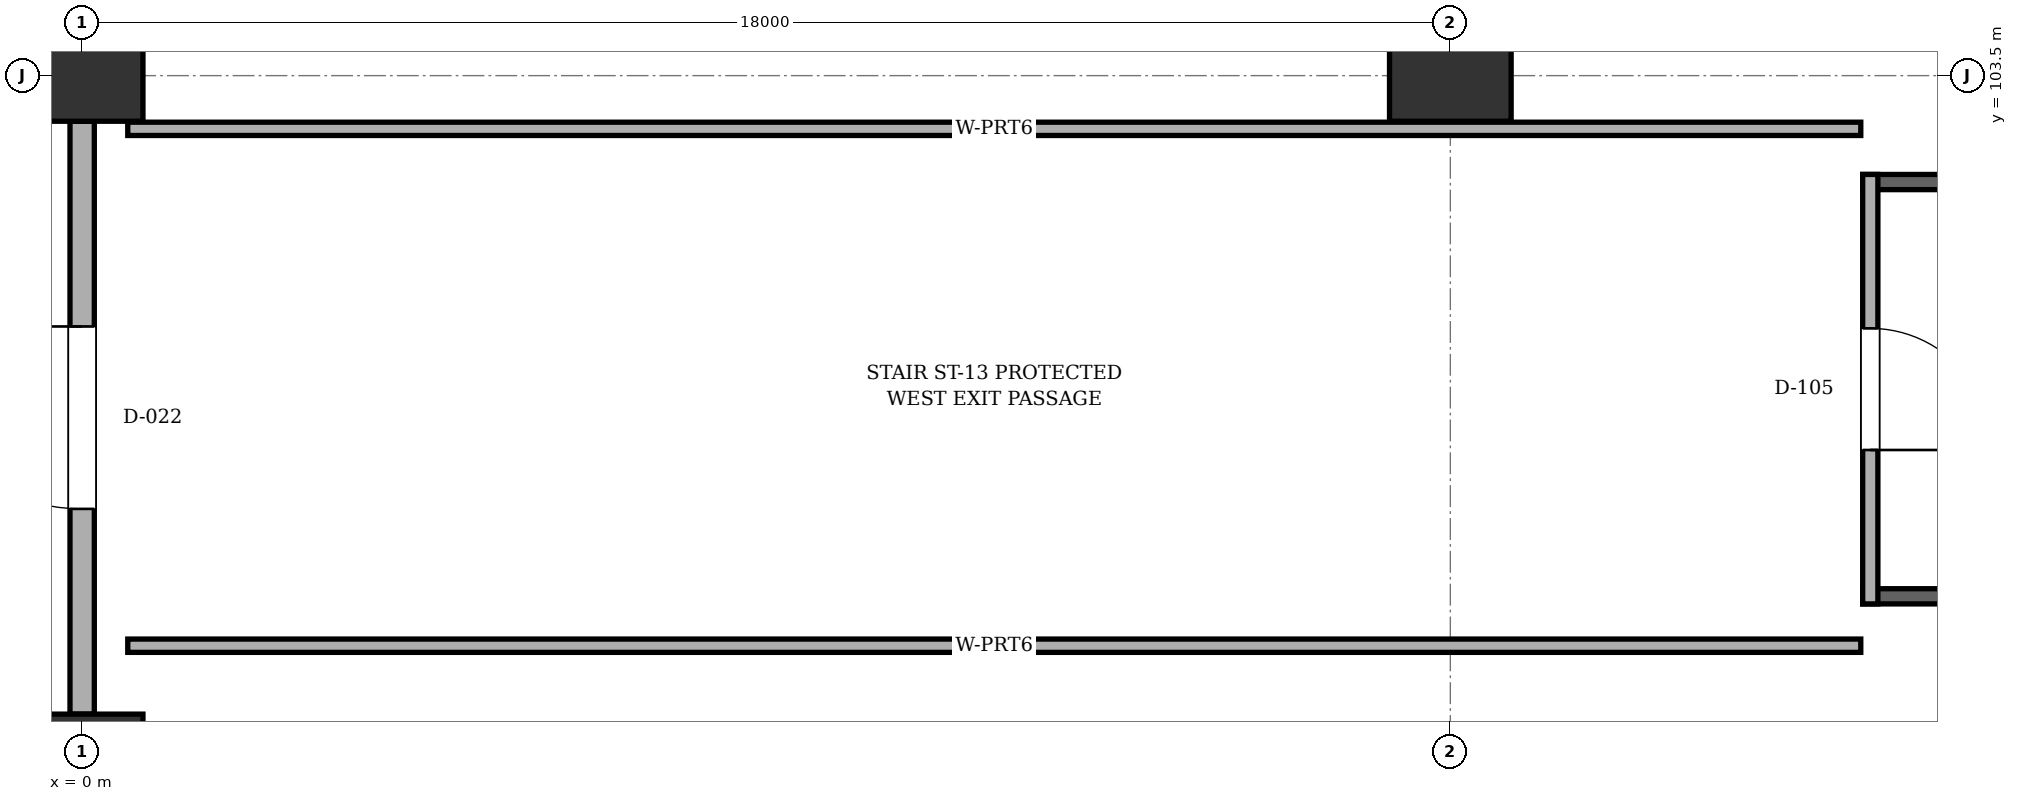
"""IFC4 building model, lengths in metres.
Left out: names, types, materials, properties, quantities, classifications, styles, units other than length and angle.
Written with IfcOpenShell. Run it as: python <this file> out.ifc"""

import sys

from ifc_helpers import new_model, si_unit, direction, frame, frame_2d, origin, origin_2d, place, context, subcontext, project, spatial, rectangle, extrude, element, fill, save


model = new_model("IFC4")
c1 = context("Model", 3, precision=1e-05, world=origin(), true_north=direction((0.0, 1.0)))
c2 = subcontext(c1, "Body", "Model", "MODEL_VIEW")
j1 = project(units=[si_unit("LENGTHUNIT", "METRE"), si_unit("PLANEANGLEUNIT", "RADIAN")], contexts=[c1])
p1 = place(None, origin())
s1 = spatial("IfcSite", under=j1, at=p1, CompositionType="ELEMENT")
p2 = place(p1, origin())
s2 = spatial("IfcBuilding", under=s1, at=p2, CompositionType="ELEMENT")
p3 = place(p2, origin())
s3 = spatial("IfcBuildingStorey", under=s2, at=p3, CompositionType="ELEMENT", Elevation=0.0)
for number, where, z_axis, x_axis in (
    (1, (0.0, 94.5, 0.0), (0.0, 0.0, 1.0), (1.0, 0.0, 0.0)),
    (2, (0.0, 103.5, 0.0), (0.0, 0.0, 1.0), (1.0, 0.0, 0.0)),
    (3, (18.0, 103.5, 0.0), (0.0, 0.0, 1.0), (1.0, 0.0, 0.0)),
):
    element("IfcColumn", number, at=place(p3, frame(where, z_axis=z_axis, x_axis=x_axis)), inside=s3, PredefinedType="COLUMN", context=c2, shape_type="SweptSolid", body=[
        extrude(rectangle(XDim=1.6, YDim=1.2, at=origin_2d()), origin(), (0.0, 0.0, 1.0), 6.6),
    ])
p4 = place(p3, frame((0.0, 95.1, 0.0), z_axis=(0.0, 0.0, 1.0), x_axis=(0.0, 1.0, 0.0)))
e4 = element("IfcWall", 4, at=p4, inside=s3, PredefinedType="SOLIDWALL", context=c2, shape_type="SweptSolid", body=[
    extrude(rectangle(XDim=7.8, YDim=0.32, at=frame_2d((3.9, 0.0))), origin(), (0.0, 0.0, 1.0), 5.495),
])
p5 = place(p4, frame((2.7, 0.0, 0.0)))
e5 = element("IfcOpeningElement", 5, at=p5, cuts=e4, PredefinedType="OPENING", context=c2, shape_type="SweptSolid", body=[
    extrude(rectangle(XDim=2.4, YDim=2.5, at=frame_2d((1.2, 1.25))), frame((0.0, 0.17, 0.0), z_axis=(0.0, -1.0, 0.0), x_axis=(1.0, 0.0, 0.0)), (0.0, 0.0, 1.0), 0.34),
])
for number, where, z_axis, x_axis in (
    (6, (23.425, 96.65, 0.0), (0.0, 0.0, 1.0), (1.0, 0.0, 0.0)),
    (7, (35.25, 102.1, 0.0), (0.0, 0.0, 1.0), (-1.0, 0.0, 0.0)),
):
    element("IfcWall", number, at=place(p3, frame(where, z_axis=z_axis, x_axis=x_axis)), inside=s3, PredefinedType="SOLIDWALL", context=c2, shape_type="SweptSolid", body=[
        extrude(rectangle(XDim=11.825, YDim=0.2, at=frame_2d((5.913, 0.0))), origin(), (0.0, 0.0, 1.0), 6.32),
    ])
p6 = place(p3, frame((23.525, 102.2, 0.0), z_axis=(0.0, 0.0, 1.0), x_axis=(0.0, -1.0, 0.0)))
e8 = element("IfcWall", 8, at=p6, inside=s3, PredefinedType="SOLIDWALL", context=c2, shape_type="SweptSolid", body=[
    extrude(rectangle(XDim=5.65, YDim=0.2, at=frame_2d((2.825, 0.0))), origin(), (0.0, 0.0, 1.0), 4.4),
])
p7 = place(p6, frame((2.025, 0.0, 0.0)))
e9 = element("IfcOpeningElement", 9, at=p7, cuts=e8, PredefinedType="OPENING", context=c2, shape_type="SweptSolid", body=[
    extrude(rectangle(XDim=1.6, YDim=2.15, at=frame_2d((0.8, 1.075))), frame((0.0, 0.11, 0.0), z_axis=(0.0, -1.0, 0.0), x_axis=(1.0, 0.0, 0.0)), (0.0, 0.0, 1.0), 0.22),
])
for number, where, z_axis, x_axis in (
    (10, (23.4, 96.0, 0.0), (0.0, 0.0, 1.0), (-1.0, 0.0, 0.0)),
    (11, (0.6, 102.8, 0.0), (0.0, 0.0, 1.0), (1.0, 0.0, 0.0)),
):
    element("IfcWall", number, at=place(p3, frame(where, z_axis=z_axis, x_axis=x_axis)), inside=s3, PredefinedType="PARTITIONING", context=c2, shape_type="SweptSolid", body=[
        extrude(rectangle(XDim=22.8, YDim=0.175, at=frame_2d((11.4, 0.0))), origin(), (0.0, 0.0, 1.0), 4.4),
    ])
p8 = place(p5, origin())
e12 = element("IfcDoor", 12, at=p8, inside=s3, OperationType="SINGLE_SWING_RIGHT", PredefinedType="DOOR", context=c2, shape_type="SweptSolid", body=[
    extrude(rectangle(XDim=2.4, YDim=2.5, at=frame_2d((1.2, 1.25))), frame((0.0, 0.025, 0.0), z_axis=(0.0, -1.0, 0.0), x_axis=(1.0, 0.0, 0.0)), (0.0, 0.0, 1.0), 0.05),
])
fill(e5, e12)
p9 = place(p7, origin())
e13 = element("IfcDoor", 13, at=p9, inside=s3, OperationType="SINGLE_SWING_RIGHT", PredefinedType="DOOR", context=c2, shape_type="SweptSolid", body=[
    extrude(rectangle(XDim=1.6, YDim=2.15, at=frame_2d((0.8, 1.075))), frame((0.0, 0.025, 0.0), z_axis=(0.0, -1.0, 0.0), x_axis=(1.0, 0.0, 0.0)), (0.0, 0.0, 1.0), 0.05),
])
fill(e9, e13)
save(model, sys.argv[1])
